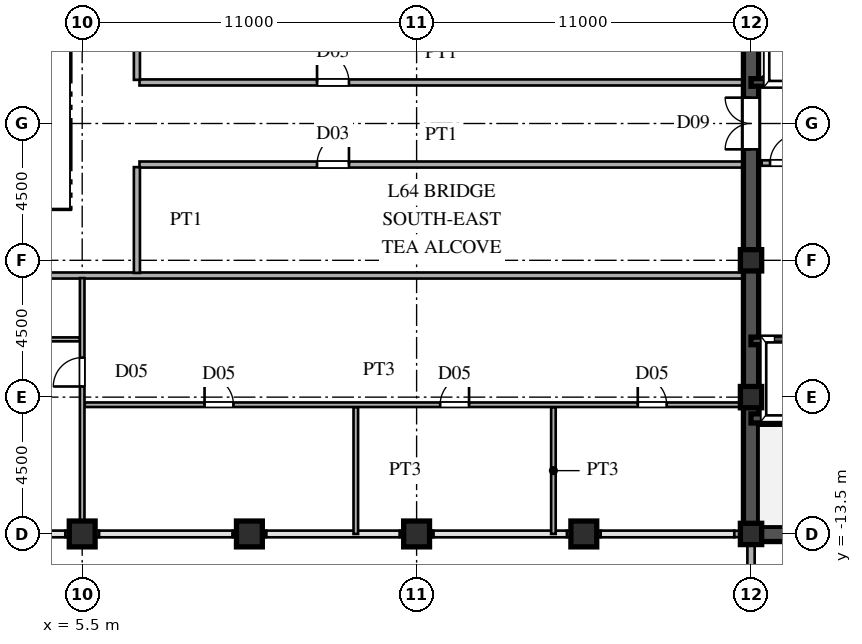
"""IFC4 building model, lengths in metres.
Left out: names, types, materials, properties, quantities, classifications, styles, units other than length and angle.
Written with IfcOpenShell. Run it as: python <this file> out.ifc"""

import sys

from ifc_helpers import new_model, si_unit, direction, frame, frame_2d, origin, origin_2d, place, context, subcontext, project, spatial, rectangle, hollow_rectangle, extrude, source, transform, mapped, element, fill, save


model = new_model("IFC4")
c1 = context("Model", 3, precision=1e-05, world=origin(), true_north=direction((0.0, 1.0)))
c2 = subcontext(c1, "Body", "Model", "MODEL_VIEW")
j1 = project(units=[si_unit("LENGTHUNIT", "METRE"), si_unit("PLANEANGLEUNIT", "RADIAN")], contexts=[c1])
p1 = place(None, origin())
s1 = spatial("IfcSite", under=j1, at=p1, CompositionType="ELEMENT")
p2 = place(p1, origin())
s2 = spatial("IfcBuilding", under=s1, at=p2, CompositionType="ELEMENT")
p3 = place(p2, frame((0.0, 0.0, 243.15)))
s3 = spatial("IfcBuildingStorey", under=s2, at=p3, CompositionType="ELEMENT", Elevation=243.15)
m1 = source(origin(), c2, "Body", "SweptSolid", [
    extrude(hollow_rectangle(XDim=0.7, YDim=0.7, WallThickness=0.03, at=origin_2d()), origin(), (0.0, 0.0, 1.0), 3.75),
])
for number, where, z_axis, x_axis in (
    (1, (27.5, -13.5, 0.0), (0.0, 0.0, 1.0), (1.0, 0.0, 0.0)),
    (2, (27.5, -9.0, 0.0), (0.0, 0.0, 1.0), (1.0, 0.0, 0.0)),
    (3, (27.5, -4.5, 0.0), (0.0, 0.0, 1.0), (1.0, 0.0, 0.0)),
):
    element("IfcColumn", number, at=place(p3, frame(where, z_axis=z_axis, x_axis=x_axis)), inside=s3, PredefinedType="COLUMN", context=c2, shape_type="MappedRepresentation", body=[
        mapped(m1, transform((0.0, 0.0, 0.0), scale=1.0)),
    ])
m2 = source(origin(), c2, "Body", "SweptSolid", [
    extrude(hollow_rectangle(XDim=0.85, YDim=0.85, WallThickness=0.036, at=origin_2d()), origin(), (0.0, 0.0, 1.0), 3.75),
])
for number, where, z_axis, x_axis in (
    (4, (5.5, -13.5, 0.0), (0.0, 0.0, 1.0), (1.0, 0.0, 0.0)),
    (5, (11.0, -13.5, 0.0), (0.0, 0.0, 1.0), (1.0, 0.0, 0.0)),
    (6, (16.5, -13.5, 0.0), (0.0, 0.0, 1.0), (1.0, 0.0, 0.0)),
    (7, (22.0, -13.5, 0.0), (0.0, 0.0, 1.0), (1.0, 0.0, 0.0)),
):
    element("IfcColumn", number, at=place(p3, frame(where, z_axis=z_axis, x_axis=x_axis)), inside=s3, PredefinedType="COLUMN", context=c2, shape_type="MappedRepresentation", body=[
        mapped(m2, transform((0.0, 0.0, 0.0), scale=1.0)),
    ])
p4 = place(p3, frame((27.5, -15.98, 0.0), z_axis=(0.0, 0.0, 1.0), x_axis=(0.0, 1.0, 0.0)))
e8 = element("IfcWall", 8, at=p4, inside=s3, PredefinedType="SOLIDWALL", context=c2, shape_type="SweptSolid", body=[
    extrude(rectangle(XDim=1.605, YDim=0.24, at=frame_2d((0.803, 0.0))), origin(), (0.0, 0.0, 1.0), 3.53),
])
p5 = place(p3, frame((27.5, -14.375, 0.0), z_axis=(0.0, 0.0, 1.0), x_axis=(0.0, 1.0, 0.0)))
e9 = element("IfcWall", 9, at=p5, inside=s3, PredefinedType="SOLIDWALL", context=c2, shape_type="SweptSolid", body=[
    extrude(rectangle(XDim=0.62, YDim=0.24, at=frame_2d((0.31, 0.0))), origin(), (0.0, 0.0, 1.0), 3.03),
])
for number, where, z_axis, x_axis in (
    (10, (4.95, -13.5, 0.0), (0.0, 0.0, 1.0), (1.0, 0.0, 0.0)),
    (11, (10.45, -13.5, 0.0), (0.0, 0.0, 1.0), (1.0, 0.0, 0.0)),
    (12, (15.95, -13.5, 0.0), (0.0, 0.0, 1.0), (1.0, 0.0, 0.0)),
    (13, (21.45, -13.5, 0.0), (0.0, 0.0, 1.0), (1.0, 0.0, 0.0)),
):
    element("IfcWall", number, at=place(p3, frame(where, z_axis=z_axis, x_axis=x_axis)), inside=s3, PredefinedType="SOLIDWALL", context=c2, shape_type="SweptSolid", body=[
        extrude(rectangle(XDim=1.1, YDim=0.21, at=frame_2d((0.55, 0.0))), origin(), (0.0, 0.0, 1.0), 3.03),
    ])
p6 = place(p3, frame((26.95, -13.5, 0.0), z_axis=(0.0, 0.0, 1.0), x_axis=(1.0, 0.0, 0.0)))
e14 = element("IfcWall", 14, at=p6, inside=s3, PredefinedType="SOLIDWALL", context=c2, shape_type="SweptSolid", body=[
    extrude(rectangle(XDim=0.54, YDim=0.21, at=frame_2d((0.27, 0.0))), origin(), (0.0, 0.0, 1.0), 3.03),
])
for number, where, z_axis, x_axis in (
    (15, (27.5, -13.5, 0.0), (0.0, 0.0, 1.0), (0.0, 1.0, 0.0)),
    (16, (27.5, 1.3, 0.0), (0.0, 0.0, 1.0), (0.0, 1.0, 0.0)),
):
    element("IfcWall", number, at=place(p3, frame(where, z_axis=z_axis, x_axis=x_axis)), inside=s3, PredefinedType="SHEAR", context=c2, shape_type="SweptSolid", body=[
        extrude(rectangle(XDim=12.2, YDim=0.5, at=frame_2d((6.1, 0.0))), origin(), (0.0, 0.0, 1.0), 3.53),
    ])
p7 = place(p3, frame((27.5, -1.3, 0.0), z_axis=(0.0, 0.0, 1.0), x_axis=(0.0, 1.0, 0.0)))
e17 = element("IfcWall", 17, at=p7, inside=s3, PredefinedType="SHEAR", context=c2, shape_type="SweptSolid", body=[
    extrude(rectangle(XDim=2.6, YDim=0.5, at=frame_2d((1.3, 0.0))), origin(), (0.0, 0.0, 1.0), 3.53),
])
p8 = place(p7, frame((0.45, 0.0, 0.0)))
e18 = element("IfcOpeningElement", 18, at=p8, cuts=e17, PredefinedType="OPENING", context=c2, shape_type="SweptSolid", body=[
    extrude(rectangle(XDim=1.7, YDim=2.35, at=frame_2d((0.85, 1.175))), frame((0.0, 0.26, 0.0), z_axis=(0.0, -1.0, 0.0), x_axis=(1.0, 0.0, 0.0)), (0.0, 0.0, 1.0), 0.52),
])
p9 = place(p3, frame((27.5, -13.5, 0.0), z_axis=(0.0, 0.0, 1.0), x_axis=(1.0, 0.0, 0.0)))
e19 = element("IfcWall", 19, at=p9, inside=s3, PredefinedType="SHEAR", context=c2, shape_type="SweptSolid", body=[
    extrude(rectangle(XDim=9.0, YDim=0.5, at=frame_2d((4.5, 0.0))), origin(), (0.0, 0.0, 1.0), 3.53),
])
p10 = place(p3, frame((27.5, -9.7, 0.0), z_axis=(0.0, 0.0, 1.0), x_axis=(1.0, 0.0, 0.0)))
e20 = element("IfcWall", 20, at=p10, inside=s3, PredefinedType="SHEAR", context=c2, shape_type="SweptSolid", body=[
    extrude(rectangle(XDim=9.0, YDim=0.3, at=frame_2d((4.5, 0.0))), origin(), (0.0, 0.0, 1.0), 3.53),
])
p11 = place(p10, frame((7.3, 0.0, 0.0)))
e21 = element("IfcOpeningElement", 21, at=p11, cuts=e20, PredefinedType="OPENING", context=c2, shape_type="SweptSolid", body=[
    extrude(rectangle(XDim=1.1, YDim=2.2, at=frame_2d((0.55, 1.1))), frame((0.0, 0.16, 0.0), z_axis=(0.0, -1.0, 0.0), x_axis=(1.0, 0.0, 0.0)), (0.0, 0.0, 1.0), 0.32),
])
for number, where, z_axis, x_axis in (
    (22, (27.5, -7.15, 0.0), (0.0, 0.0, 1.0), (1.0, 0.0, 0.0)),
    (23, (27.5, 1.35, 0.0), (0.0, 0.0, 1.0), (1.0, 0.0, 0.0)),
):
    element("IfcWall", number, at=place(p3, frame(where, z_axis=z_axis, x_axis=x_axis)), inside=s3, PredefinedType="SHEAR", context=c2, shape_type="SweptSolid", body=[
        extrude(rectangle(XDim=2.8, YDim=0.25, at=frame_2d((1.4, 0.0))), origin(), (0.0, 0.0, 1.0), 3.53),
    ])
p12 = place(p3, frame((27.85, -1.3, 0.0), z_axis=(0.0, 0.0, 1.0), x_axis=(1.0, 0.0, 0.0)))
e24 = element("IfcWall", 24, at=p12, inside=s3, PredefinedType="PARTITIONING", context=c2, shape_type="SweptSolid", body=[
    extrude(rectangle(XDim=2.45, YDim=0.18, at=frame_2d((1.225, 0.0))), origin(), (0.0, 0.0, 1.0), 3.53),
])
p13 = place(p12, frame((0.275, 0.0, 0.0)))
e25 = element("IfcOpeningElement", 25, at=p13, cuts=e24, PredefinedType="OPENING", context=c2, shape_type="SweptSolid", body=[
    extrude(rectangle(XDim=0.95, YDim=2.15, at=frame_2d((0.475, 1.075))), frame((0.0, 0.1, 0.0), z_axis=(0.0, -1.0, 0.0), x_axis=(1.0, 0.0, 0.0)), (0.0, 0.0, 1.0), 0.2),
])
p14 = place(p3, frame((5.585, -9.25, 0.0), z_axis=(0.0, 0.0, 1.0), x_axis=(1.0, 0.0, 0.0)))
e26 = element("IfcWall", 26, at=p14, inside=s3, PredefinedType="PARTITIONING", context=c2, shape_type="SweptSolid", body=[
    extrude(rectangle(XDim=21.66, YDim=0.15, at=frame_2d((10.83, 0.0))), origin(), (0.0, 0.0, 1.0), 3.53),
])
p15 = place(p14, frame((3.94, 0.0, 0.0)))
e27 = element("IfcOpeningElement", 27, at=p15, cuts=e26, PredefinedType="OPENING", context=c2, shape_type="SweptSolid", body=[
    extrude(rectangle(XDim=0.95, YDim=2.15, at=frame_2d((0.475, 1.075))), frame((0.0, 0.085, 0.0), z_axis=(0.0, -1.0, 0.0), x_axis=(1.0, 0.0, 0.0)), (0.0, 0.0, 1.0), 0.17),
])
p16 = place(p14, frame((11.69, 0.0, 0.0)))
e28 = element("IfcOpeningElement", 28, at=p16, cuts=e26, PredefinedType="OPENING", context=c2, shape_type="SweptSolid", body=[
    extrude(rectangle(XDim=0.95, YDim=2.15, at=frame_2d((0.475, 1.075))), frame((0.0, 0.085, 0.0), z_axis=(0.0, -1.0, 0.0), x_axis=(1.0, 0.0, 0.0)), (0.0, 0.0, 1.0), 0.17),
])
p17 = place(p14, frame((18.19, 0.0, 0.0)))
e29 = element("IfcOpeningElement", 29, at=p17, cuts=e26, PredefinedType="OPENING", context=c2, shape_type="SweptSolid", body=[
    extrude(rectangle(XDim=0.95, YDim=2.15, at=frame_2d((0.475, 1.075))), frame((0.0, 0.085, 0.0), z_axis=(0.0, -1.0, 0.0), x_axis=(1.0, 0.0, 0.0)), (0.0, 0.0, 1.0), 0.17),
])
p18 = place(p3, frame((0.085, -7.1, 0.0), z_axis=(0.0, 0.0, 1.0), x_axis=(1.0, 0.0, 0.0)))
e30 = element("IfcWall", 30, at=p18, inside=s3, PredefinedType="PARTITIONING", context=c2, shape_type="SweptSolid", body=[
    extrude(rectangle(XDim=5.33, YDim=0.13, at=frame_2d((2.665, 0.0))), origin(), (0.0, 0.0, 1.0), 3.53),
])
p19 = place(p3, frame((-27.245, -5.0, 0.0), z_axis=(0.0, 0.0, 1.0), x_axis=(1.0, 0.0, 0.0)))
e31 = element("IfcWall", 31, at=p19, inside=s3, PredefinedType="PARTITIONING", context=c2, shape_type="SweptSolid", body=[
    extrude(rectangle(XDim=54.49, YDim=0.2, at=frame_2d((27.245, 0.0))), origin(), (0.0, 0.0, 1.0), 3.53),
])
p20 = place(p19, frame((23.47, 0.0, 0.0)))
e32 = element("IfcOpeningElement", 32, at=p20, cuts=e31, PredefinedType="OPENING", context=c2, shape_type="SweptSolid", body=[
    extrude(rectangle(XDim=1.05, YDim=2.25, at=frame_2d((0.525, 1.125))), frame((0.0, 0.11, 0.0), z_axis=(0.0, -1.0, 0.0), x_axis=(1.0, 0.0, 0.0)), (0.0, 0.0, 1.0), 0.22),
])
p21 = place(p3, frame((7.385, -1.35, 0.0), z_axis=(0.0, 0.0, 1.0), x_axis=(1.0, 0.0, 0.0)))
e33 = element("IfcWall", 33, at=p21, inside=s3, PredefinedType="PARTITIONING", context=c2, shape_type="SweptSolid", body=[
    extrude(rectangle(XDim=19.86, YDim=0.2, at=frame_2d((9.93, 0.0))), origin(), (0.0, 0.0, 1.0), 3.53),
])
p22 = place(p21, frame((5.84, 0.0, 0.0)))
e34 = element("IfcOpeningElement", 34, at=p22, cuts=e33, PredefinedType="OPENING", context=c2, shape_type="SweptSolid", body=[
    extrude(rectangle(XDim=1.05, YDim=2.25, at=frame_2d((0.525, 1.125))), frame((0.0, 0.11, 0.0), z_axis=(0.0, -1.0, 0.0), x_axis=(1.0, 0.0, 0.0)), (0.0, 0.0, 1.0), 0.22),
])
p23 = place(p3, frame((7.385, 1.35, 0.0), z_axis=(0.0, 0.0, 1.0), x_axis=(1.0, 0.0, 0.0)))
e35 = element("IfcWall", 35, at=p23, inside=s3, PredefinedType="PARTITIONING", context=c2, shape_type="SweptSolid", body=[
    extrude(rectangle(XDim=19.86, YDim=0.2, at=frame_2d((9.93, 0.0))), origin(), (0.0, 0.0, 1.0), 3.53),
])
p24 = place(p23, frame((5.84, 0.0, 0.0)))
e36 = element("IfcOpeningElement", 36, at=p24, cuts=e35, PredefinedType="OPENING", context=c2, shape_type="SweptSolid", body=[
    extrude(rectangle(XDim=1.05, YDim=2.25, at=frame_2d((0.525, 1.125))), frame((0.0, 0.11, 0.0), z_axis=(0.0, -1.0, 0.0), x_axis=(1.0, 0.0, 0.0)), (0.0, 0.0, 1.0), 0.22),
])
p25 = place(p3, frame((5.5, -13.39, 0.0), z_axis=(0.0, 0.0, 1.0), x_axis=(0.0, 1.0, 0.0)))
e37 = element("IfcWall", 37, at=p25, inside=s3, PredefinedType="PARTITIONING", context=c2, shape_type="SweptSolid", body=[
    extrude(rectangle(XDim=8.305, YDim=0.15, at=frame_2d((4.152, 0.0))), origin(), (0.0, 0.0, 1.0), 2.43),
])
p26 = place(p25, frame((4.74, 0.0, 0.0)))
e38 = element("IfcOpeningElement", 38, at=p26, cuts=e37, PredefinedType="OPENING", context=c2, shape_type="SweptSolid", body=[
    extrude(rectangle(XDim=0.95, YDim=2.15, at=frame_2d((0.475, 1.075))), frame((0.0, 0.085, 0.0), z_axis=(0.0, -1.0, 0.0), x_axis=(1.0, 0.0, 0.0)), (0.0, 0.0, 1.0), 0.17),
])
for number, where, z_axis, x_axis in (
    (39, (7.3, -4.915, 0.0), (0.0, 0.0, 1.0), (0.0, 1.0, 0.0)),
    (40, (7.3, 1.435, 0.0), (0.0, 0.0, 1.0), (0.0, 1.0, 0.0)),
):
    element("IfcWall", number, at=place(p3, frame(where, z_axis=z_axis, x_axis=x_axis)), inside=s3, PredefinedType="PARTITIONING", context=c2, shape_type="SweptSolid", body=[
        extrude(rectangle(XDim=3.48, YDim=0.2, at=frame_2d((1.74, 0.0))), origin(), (0.0, 0.0, 1.0), 3.53),
    ])
for number, where, z_axis, x_axis in (
    (41, (14.5, -13.5, 0.0), (0.0, 0.0, 1.0), (0.0, 1.0, 0.0)),
    (42, (21.0, -13.5, 0.0), (0.0, 0.0, 1.0), (0.0, 1.0, 0.0)),
):
    element("IfcWall", number, at=place(p3, frame(where, z_axis=z_axis, x_axis=x_axis)), inside=s3, PredefinedType="PARTITIONING", context=c2, shape_type="SweptSolid", body=[
        extrude(rectangle(XDim=4.165, YDim=0.15, at=frame_2d((2.083, 0.0))), origin(), (0.0, 0.0, 1.0), 3.53),
    ])
m3 = source(origin(), c2, "Body", "SweptSolid", [
    extrude(rectangle(XDim=1.7, YDim=2.35, at=frame_2d((0.85, 1.175))), frame((0.0, 0.025, 0.0), z_axis=(0.0, -1.0, 0.0), x_axis=(1.0, 0.0, 0.0)), (0.0, 0.0, 1.0), 0.05),
])
p27 = place(p8, origin())
e43 = element("IfcDoor", 43, at=p27, inside=s3, OperationType="DOUBLE_SWING_LEFT", PredefinedType="DOOR", context=c2, shape_type="MappedRepresentation", body=[
    mapped(m3, transform((0.0, 0.0, 0.0), scale=1.0)),
])
fill(e18, e43)
m4 = source(origin(), c2, "Body", "SweptSolid", [
    extrude(rectangle(XDim=0.95, YDim=2.15, at=frame_2d((0.475, 1.075))), frame((0.0, 0.025, 0.0), z_axis=(0.0, -1.0, 0.0), x_axis=(1.0, 0.0, 0.0)), (0.0, 0.0, 1.0), 0.05),
])
p28 = place(p13, origin())
e44 = element("IfcDoor", 44, at=p28, inside=s3, OperationType="SINGLE_SWING_RIGHT", PredefinedType="DOOR", context=c2, shape_type="MappedRepresentation", body=[
    mapped(m4, transform((0.0, 0.0, 0.0), scale=1.0)),
])
fill(e25, e44)
m5 = source(origin(), c2, "Body", "SweptSolid", [
    extrude(rectangle(XDim=0.95, YDim=2.15, at=frame_2d((0.475, 1.075))), frame((0.0, 0.025, 0.0), z_axis=(0.0, -1.0, 0.0), x_axis=(1.0, 0.0, 0.0)), (0.0, 0.0, 1.0), 0.05),
])
p29 = place(p15, origin())
e45 = element("IfcDoor", 45, at=p29, inside=s3, OperationType="SINGLE_SWING_LEFT", PredefinedType="DOOR", context=c2, shape_type="MappedRepresentation", body=[
    mapped(m5, transform((0.0, 0.0, 0.0), scale=1.0)),
])
fill(e27, e45)
p30 = place(p16, origin())
e46 = element("IfcDoor", 46, at=p30, inside=s3, OperationType="SINGLE_SWING_RIGHT", PredefinedType="DOOR", context=c2, shape_type="MappedRepresentation", body=[
    mapped(m5, transform((0.0, 0.0, 0.0), scale=1.0)),
])
fill(e28, e46)
p31 = place(p17, origin())
e47 = element("IfcDoor", 47, at=p31, inside=s3, OperationType="SINGLE_SWING_LEFT", PredefinedType="DOOR", context=c2, shape_type="MappedRepresentation", body=[
    mapped(m5, transform((0.0, 0.0, 0.0), scale=1.0)),
])
fill(e29, e47)
m6 = source(origin(), c2, "Body", "SweptSolid", [
    extrude(rectangle(XDim=1.05, YDim=2.25, at=frame_2d((0.525, 1.125))), frame((0.0, 0.025, 0.0), z_axis=(0.0, -1.0, 0.0), x_axis=(1.0, 0.0, 0.0)), (0.0, 0.0, 1.0), 0.05),
])
p32 = place(p22, origin())
e48 = element("IfcDoor", 48, at=p32, inside=s3, OperationType="SINGLE_SWING_RIGHT", PredefinedType="DOOR", context=c2, shape_type="MappedRepresentation", body=[
    mapped(m6, transform((0.0, 0.0, 0.0), scale=1.0)),
])
fill(e34, e48)
p33 = place(p24, origin())
e49 = element("IfcDoor", 49, at=p33, inside=s3, OperationType="SINGLE_SWING_LEFT", PredefinedType="DOOR", context=c2, shape_type="MappedRepresentation", body=[
    mapped(m6, transform((0.0, 0.0, 0.0), scale=1.0)),
])
fill(e36, e49)
p34 = place(p26, origin())
e50 = element("IfcDoor", 50, at=p34, inside=s3, OperationType="SINGLE_SWING_LEFT", PredefinedType="DOOR", context=c2, shape_type="MappedRepresentation", body=[
    mapped(m5, transform((0.0, 0.0, 0.0), scale=1.0)),
])
fill(e38, e50)
save(model, sys.argv[1])
